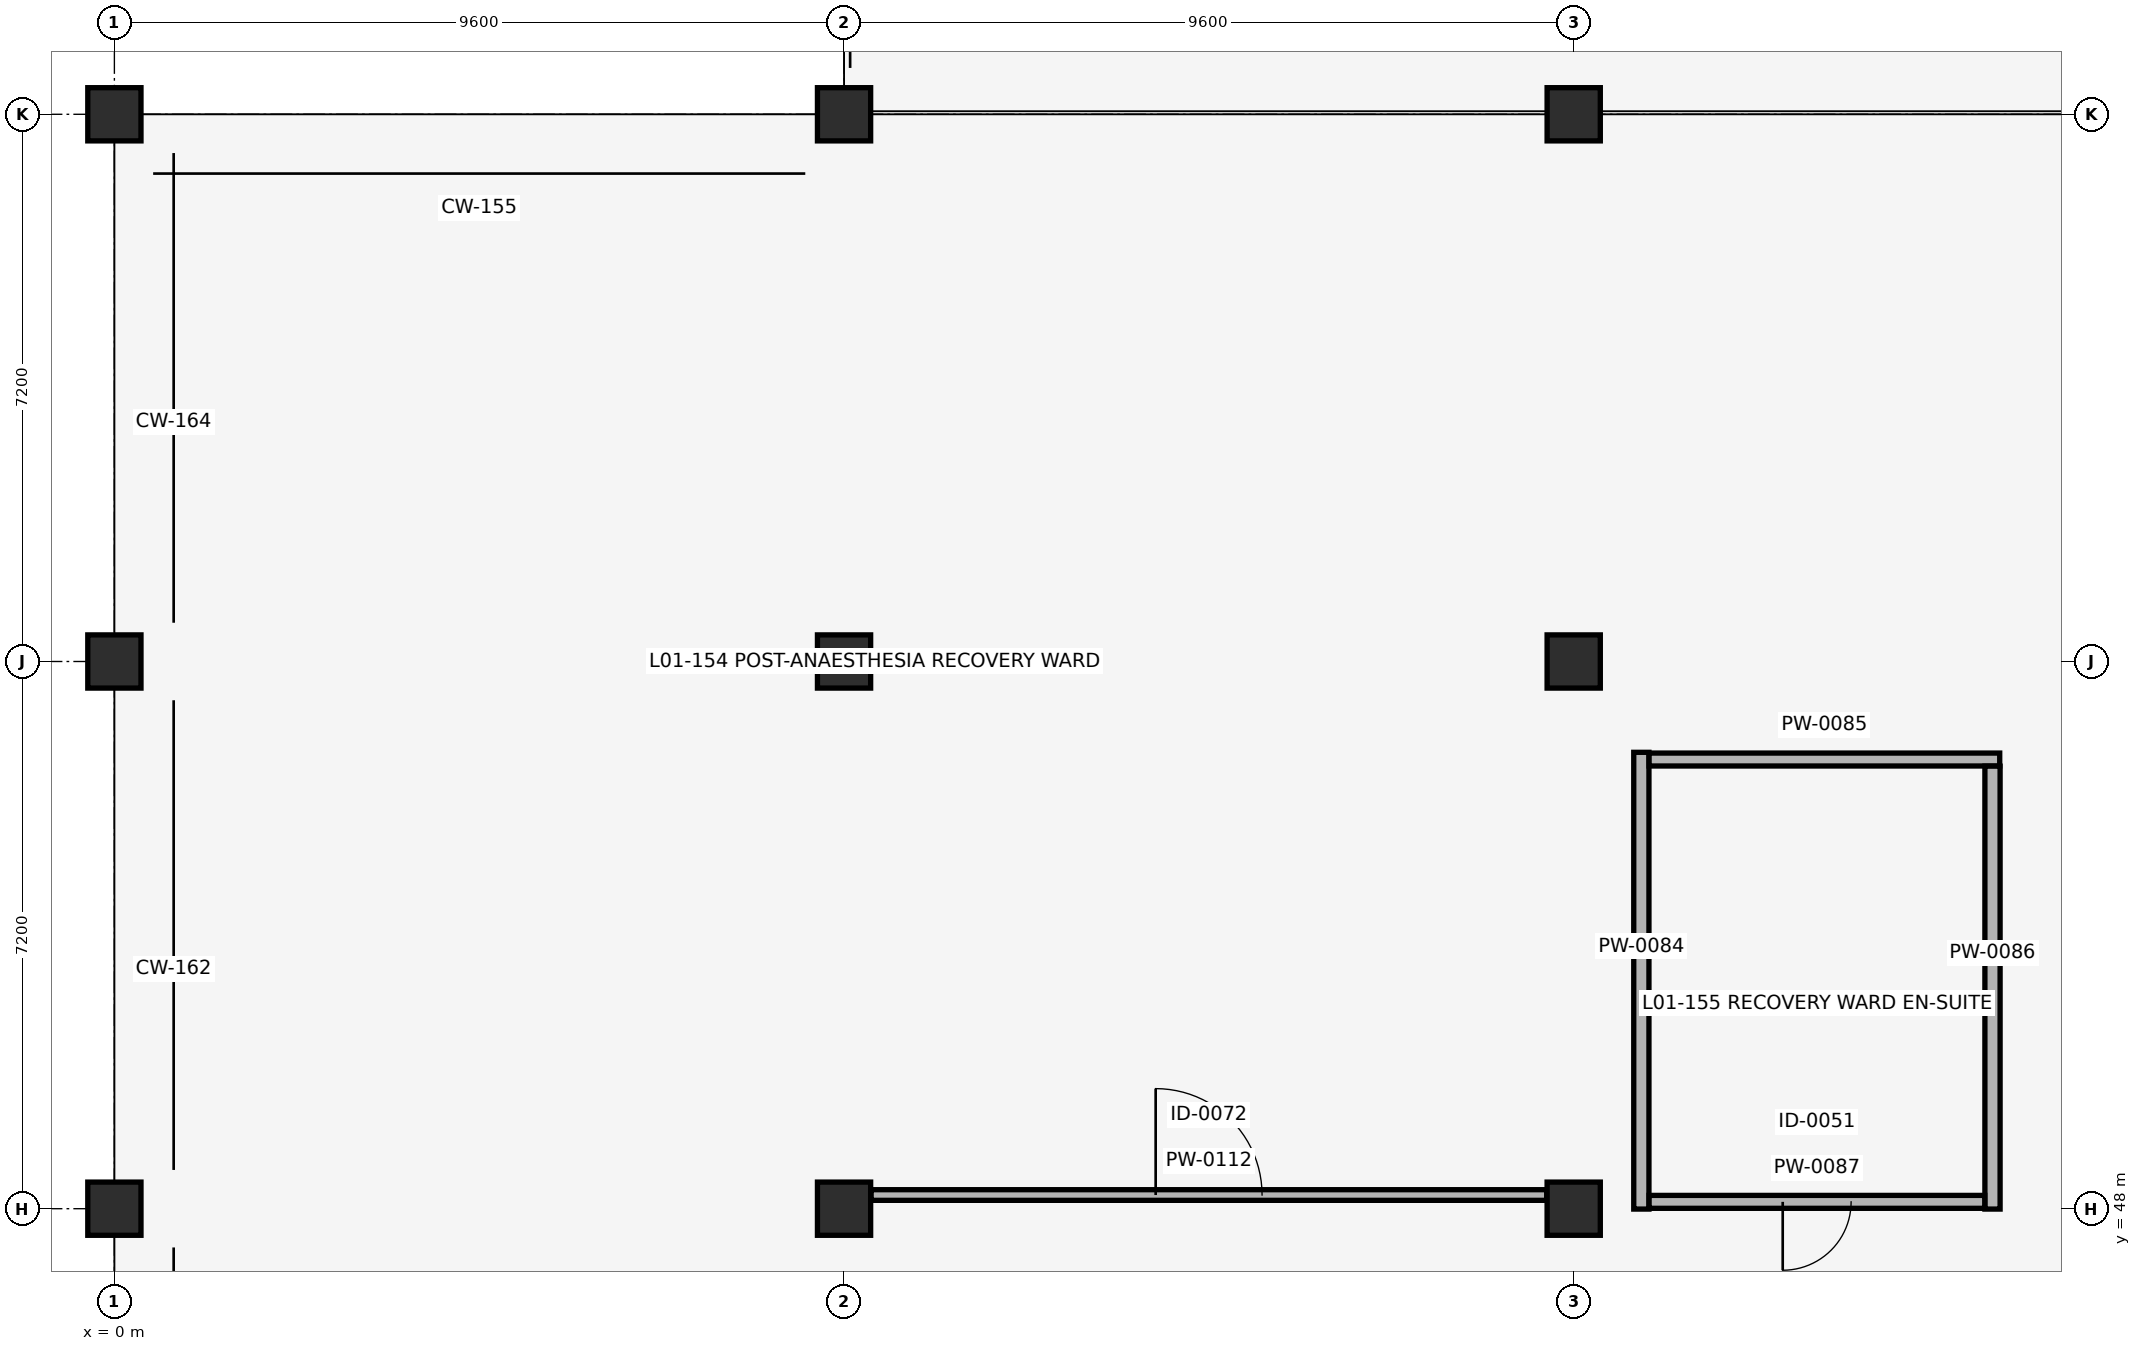
"""IFC4 building model, lengths in metres.
Left out: names, types, materials, properties, quantities, classifications, styles, units other than length and angle.
Written with IfcOpenShell. Run it as: python <this file> out.ifc"""

import sys

from ifc_helpers import new_model, si_unit, direction, frame, frame_2d, origin, origin_2d, place, context, subcontext, project, spatial, rectangle, circle, extrude, element, fill, save


model = new_model("IFC4")
c1 = context("Model", 3, precision=1e-05, world=origin(), true_north=direction((0.0, 1.0)))
c2 = subcontext(c1, "Body", "Model", "MODEL_VIEW")
j1 = project(units=[si_unit("LENGTHUNIT", "METRE"), si_unit("PLANEANGLEUNIT", "RADIAN")], contexts=[c1])
p1 = place(None, origin())
s1 = spatial("IfcSite", under=j1, at=p1, CompositionType="ELEMENT")
p2 = place(p1, origin())
s2 = spatial("IfcBuilding", under=s1, at=p2, CompositionType="ELEMENT")
p3 = place(p2, frame((0.0, 0.0, 4.42)))
s3 = spatial("IfcBuildingStorey", under=s2, at=p3, CompositionType="ELEMENT", Elevation=4.42)
for number, where, z_axis, x_axis in (
    (1, (0.0, 48.0, 0.0), (0.0, 0.0, 1.0), (1.0, 0.0, 0.0)),
    (2, (0.0, 55.2, 0.0), (0.0, 0.0, 1.0), (1.0, 0.0, 0.0)),
    (3, (0.0, 62.4, 0.0), (0.0, 0.0, 1.0), (1.0, 0.0, 0.0)),
    (4, (9.6, 48.0, 0.0), (0.0, 0.0, 1.0), (1.0, 0.0, 0.0)),
    (5, (9.6, 55.2, 0.0), (0.0, 0.0, 1.0), (1.0, 0.0, 0.0)),
    (6, (9.6, 62.4, 0.0), (0.0, 0.0, 1.0), (1.0, 0.0, 0.0)),
    (7, (19.2, 48.0, 0.0), (0.0, 0.0, 1.0), (1.0, 0.0, 0.0)),
    (8, (19.2, 55.2, 0.0), (0.0, 0.0, 1.0), (1.0, 0.0, 0.0)),
    (9, (19.2, 62.4, 0.0), (0.0, 0.0, 1.0), (1.0, 0.0, 0.0)),
):
    element("IfcColumn", number, at=place(p3, frame(where, z_axis=z_axis, x_axis=x_axis)), inside=s3, PredefinedType="COLUMN", context=c2, shape_type="SweptSolid", body=[
        extrude(circle(Radius=0.35, at=origin_2d()), origin(), (0.0, 0.0, 1.0), 4.08),
    ])
p4 = place(p3, frame((20.09, 47.995, 0.0), z_axis=(0.0, 0.0, 1.0), x_axis=(0.0, 1.0, 0.0)))
e10 = element("IfcWall", 10, at=p4, inside=s3, PredefinedType="PLUMBINGWALL", context=c2, shape_type="SweptSolid", body=[
    extrude(rectangle(XDim=6.01, YDim=0.2, at=frame_2d((3.005, 0.0))), origin(), (0.0, 0.0, 1.0), 3.11),
])
p5 = place(p3, frame((20.192, 53.91, 0.0), z_axis=(0.0, 0.0, 1.0), x_axis=(1.0, 0.0, 0.0)))
e11 = element("IfcWall", 11, at=p5, inside=s3, PredefinedType="PLUMBINGWALL", context=c2, shape_type="SweptSolid", body=[
    extrude(rectangle(XDim=4.613, YDim=0.17, at=frame_2d((2.307, 0.0))), origin(), (0.0, 0.0, 1.0), 3.12),
])
p6 = place(p3, frame((24.71, 47.995, 0.0), z_axis=(0.0, 0.0, 1.0), x_axis=(0.0, 1.0, 0.0)))
e12 = element("IfcWall", 12, at=p6, inside=s3, PredefinedType="PLUMBINGWALL", context=c2, shape_type="SweptSolid", body=[
    extrude(rectangle(XDim=5.828, YDim=0.2, at=frame_2d((2.914, 0.0))), origin(), (0.0, 0.0, 1.0), 3.11),
])
p7 = place(p3, frame((20.192, 48.09, 0.0), z_axis=(0.0, 0.0, 1.0), x_axis=(1.0, 0.0, 0.0)))
e13 = element("IfcWall", 13, at=p7, inside=s3, PredefinedType="PLUMBINGWALL", context=c2, shape_type="SweptSolid", body=[
    extrude(rectangle(XDim=4.416, YDim=0.17, at=frame_2d((2.208, 0.0))), origin(), (0.0, 0.0, 1.0), 3.11),
])
p8 = place(p7, frame((1.758, 0.0, 0.0)))
e14 = element("IfcOpeningElement", 14, at=p8, cuts=e13, PredefinedType="OPENING", context=c2, shape_type="SweptSolid", body=[
    extrude(rectangle(XDim=0.9, YDim=2.06, at=frame_2d((0.45, 1.03))), frame((0.0, 0.095, 0.0), z_axis=(0.0, -1.0, 0.0), x_axis=(1.0, 0.0, 0.0)), (0.0, 0.0, 1.0), 0.19),
])
p9 = place(p3, frame((9.955, 48.18, 0.0), z_axis=(0.0, 0.0, 1.0), x_axis=(1.0, 0.0, 0.0)))
e15 = element("IfcWall", 15, at=p9, inside=s3, PredefinedType="PARTITIONING", context=c2, shape_type="SweptSolid", body=[
    extrude(rectangle(XDim=8.89, YDim=0.14, at=frame_2d((4.445, 0.0))), origin(), (0.0, 0.0, 1.0), 3.11),
])
p10 = place(p9, frame((3.745, 0.0, 0.0)))
e16 = element("IfcOpeningElement", 16, at=p10, cuts=e15, PredefinedType="OPENING", context=c2, shape_type="SweptSolid", body=[
    extrude(rectangle(XDim=1.4, YDim=2.12, at=frame_2d((0.7, 1.06))), frame((0.0, 0.08, 0.0), z_axis=(0.0, -1.0, 0.0), x_axis=(1.0, 0.0, 0.0)), (0.0, 0.0, 1.0), 0.16),
])
p11 = place(p8, origin())
e17 = element("IfcDoor", 17, at=p11, inside=s3, OperationType="SINGLE_SWING_RIGHT", PredefinedType="DOOR", context=c2, shape_type="SweptSolid", body=[
    extrude(rectangle(XDim=0.9, YDim=2.06, at=frame_2d((0.45, 1.03))), frame((0.0, 0.025, 0.0), z_axis=(0.0, -1.0, 0.0), x_axis=(1.0, 0.0, 0.0)), (0.0, 0.0, 1.0), 0.05),
])
fill(e14, e17)
p12 = place(p10, origin())
e18 = element("IfcDoor", 18, at=p12, inside=s3, OperationType="SINGLE_SWING_LEFT", PredefinedType="DOOR", context=c2, shape_type="SweptSolid", body=[
    extrude(rectangle(XDim=1.4, YDim=2.12, at=frame_2d((0.7, 1.06))), frame((0.0, 0.025, 0.0), z_axis=(0.0, -1.0, 0.0), x_axis=(1.0, 0.0, 0.0)), (0.0, 0.0, 1.0), 0.05),
])
fill(e16, e18)
save(model, sys.argv[1])
